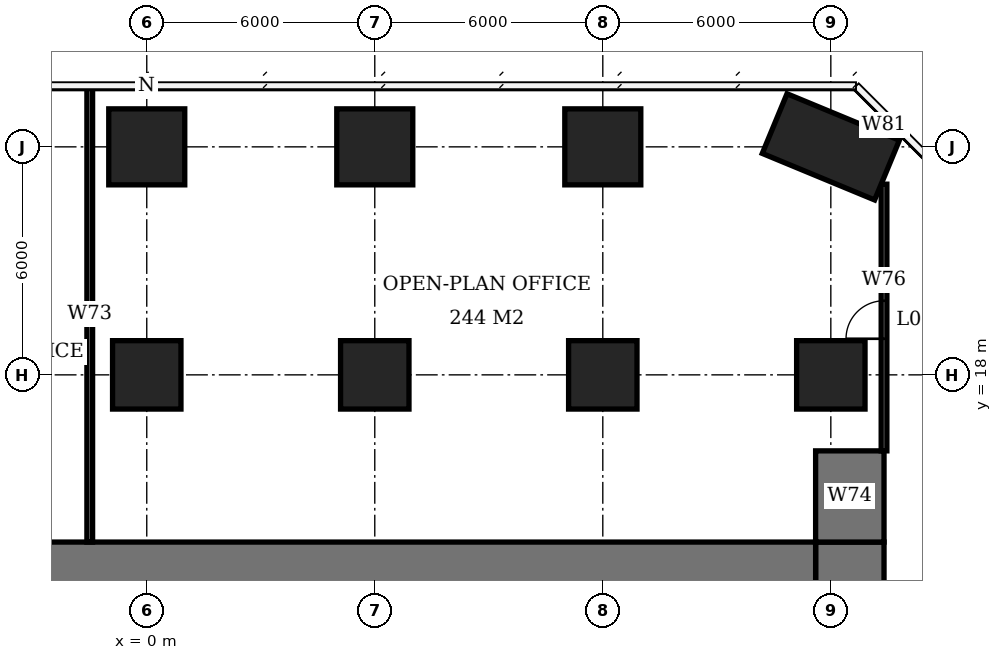
"""IFC4 building model, lengths in metres.
Left out: names, types, materials, properties, quantities, classifications, styles, units other than length and angle.
Written with IfcOpenShell. Run it as: python <this file> out.ifc"""

import sys

from ifc_helpers import new_model, si_unit, direction, frame, frame_2d, origin, origin_2d, place, context, subcontext, project, spatial, rectangle, extrude, element, fill, save


model = new_model("IFC4")
c1 = context("Model", 3, precision=1e-05, world=origin(), true_north=direction((0.0, 1.0)))
c2 = subcontext(c1, "Body", "Model", "MODEL_VIEW")
j1 = project(units=[si_unit("LENGTHUNIT", "METRE"), si_unit("PLANEANGLEUNIT", "RADIAN")], contexts=[c1])
p1 = place(None, origin())
s1 = spatial("IfcSite", under=j1, at=p1, CompositionType="ELEMENT")
p2 = place(p1, origin())
s2 = spatial("IfcBuilding", under=s1, at=p2, CompositionType="ELEMENT")
p3 = place(p2, frame((0.0, 0.0, 18.2)))
s3 = spatial("IfcBuildingStorey", under=s2, at=p3, CompositionType="ELEMENT", Elevation=18.2)
p4 = place(p3, frame((0.0, 18.0, 0.0), z_axis=(0.0, 0.0, 1.0), x_axis=(1.0, 0.0, 0.0)))
e1 = element("IfcColumn", 1, at=p4, inside=s3, PredefinedType="COLUMN", context=c2, shape_type="SweptSolid", body=[
    extrude(rectangle(XDim=1.8, YDim=1.8, at=origin_2d()), origin(), (0.0, 0.0, 1.0), 3.9),
])
p5 = place(p3, frame((0.0, 24.0, 0.0), z_axis=(0.0, 0.0, 1.0), x_axis=(1.0, 0.0, 0.0)))
e2 = element("IfcColumn", 2, at=p5, inside=s3, PredefinedType="COLUMN", context=c2, shape_type="SweptSolid", body=[
    extrude(rectangle(XDim=2.0, YDim=2.0, at=origin_2d()), origin(), (0.0, 0.0, 1.0), 3.9),
])
p6 = place(p3, frame((6.0, 18.0, 0.0), z_axis=(0.0, 0.0, 1.0), x_axis=(1.0, 0.0, 0.0)))
e3 = element("IfcColumn", 3, at=p6, inside=s3, PredefinedType="COLUMN", context=c2, shape_type="SweptSolid", body=[
    extrude(rectangle(XDim=1.8, YDim=1.8, at=origin_2d()), origin(), (0.0, 0.0, 1.0), 3.9),
])
p7 = place(p3, frame((6.0, 24.0, 0.0), z_axis=(0.0, 0.0, 1.0), x_axis=(1.0, 0.0, 0.0)))
e4 = element("IfcColumn", 4, at=p7, inside=s3, PredefinedType="COLUMN", context=c2, shape_type="SweptSolid", body=[
    extrude(rectangle(XDim=2.0, YDim=2.0, at=origin_2d()), origin(), (0.0, 0.0, 1.0), 3.9),
])
p8 = place(p3, frame((12.0, 18.0, 0.0), z_axis=(0.0, 0.0, 1.0), x_axis=(1.0, 0.0, 0.0)))
e5 = element("IfcColumn", 5, at=p8, inside=s3, PredefinedType="COLUMN", context=c2, shape_type="SweptSolid", body=[
    extrude(rectangle(XDim=1.8, YDim=1.8, at=origin_2d()), origin(), (0.0, 0.0, 1.0), 3.9),
])
p9 = place(p3, frame((12.0, 24.0, 0.0), z_axis=(0.0, 0.0, 1.0), x_axis=(1.0, 0.0, 0.0)))
e6 = element("IfcColumn", 6, at=p9, inside=s3, PredefinedType="COLUMN", context=c2, shape_type="SweptSolid", body=[
    extrude(rectangle(XDim=2.0, YDim=2.0, at=origin_2d()), origin(), (0.0, 0.0, 1.0), 3.9),
])
p10 = place(p3, frame((18.0, 18.0, 0.0), z_axis=(0.0, 0.0, 1.0), x_axis=(1.0, 0.0, 0.0)))
e7 = element("IfcColumn", 7, at=p10, inside=s3, PredefinedType="COLUMN", context=c2, shape_type="SweptSolid", body=[
    extrude(rectangle(XDim=1.8, YDim=1.8, at=origin_2d()), origin(), (0.0, 0.0, 1.0), 3.9),
])
p11 = place(p3, frame((18.0, 24.0, 0.0), z_axis=(0.0, 0.0, 1.0), x_axis=(0.923879532511, -0.382683432365, 0.0)))
e8 = element("IfcColumn", 8, at=p11, inside=s3, PredefinedType="COLUMN", context=c2, shape_type="SweptSolid", body=[
    extrude(rectangle(XDim=3.2, YDim=1.7, at=origin_2d()), origin(), (0.0, 0.0, 1.0), 3.9),
])
p12 = place(p3, frame((-5.6, 12.6, 0.0), z_axis=(0.0, 0.0, 1.0), x_axis=(1.0, 0.0, 0.0)))
e9 = element("IfcWall", 9, at=p12, inside=s3, PredefinedType="SHEAR", context=c2, shape_type="SweptSolid", body=[
    extrude(rectangle(XDim=23.2, YDim=2.0, at=frame_2d((11.6, 0.0))), origin(), (0.0, 0.0, 1.0), 3.9),
])
p13 = place(p3, frame((18.5, -7.6, 0.0), z_axis=(0.0, 0.0, 1.0), x_axis=(0.0, 1.0, 0.0)))
e10 = element("IfcWall", 10, at=p13, inside=s3, PredefinedType="SHEAR", context=c2, shape_type="SweptSolid", body=[
    extrude(rectangle(XDim=21.2, YDim=1.8, at=frame_2d((10.6, 0.0))), origin(), (0.0, 0.0, 1.0), 3.9),
])
p14 = place(p13, frame((9.2, 0.0, 0.0)))
e11 = element("IfcOpeningElement", 11, at=p14, cuts=e10, PredefinedType="OPENING", context=c2, shape_type="SweptSolid", body=[
    extrude(rectangle(XDim=1.8, YDim=2.4, at=frame_2d((0.9, 1.2))), frame((0.0, 0.91, 0.0), z_axis=(0.0, -1.0, 0.0), x_axis=(1.0, 0.0, 0.0)), (0.0, 0.0, 1.0), 1.82),
])
p15 = place(p3, frame((18.5, 13.6, 0.0), z_axis=(0.0, 0.0, 1.0), x_axis=(0.0, 1.0, 0.0)))
e12 = element("IfcWall", 12, at=p15, inside=s3, PredefinedType="SHEAR", context=c2, shape_type="SweptSolid", body=[
    extrude(rectangle(XDim=2.4, YDim=1.8, at=frame_2d((1.2, 0.0))), origin(), (0.0, 0.0, 1.0), 3.9),
])
p16 = place(p3, frame((-1.5, 13.6, 0.0), z_axis=(0.0, 0.0, 1.0), x_axis=(0.0, 1.0, 0.0)))
e13 = element("IfcWall", 13, at=p16, inside=s3, PredefinedType="PARTITIONING", context=c2, shape_type="SweptSolid", body=[
    extrude(rectangle(XDim=12.0, YDim=0.15, at=frame_2d((6.0, 0.0))), origin(), (0.0, 0.0, 1.0), 3.65),
])
p17 = place(p3, frame((19.4, 16.0, 0.0), z_axis=(0.0, 0.0, 1.0), x_axis=(0.0, 1.0, 0.0)))
e14 = element("IfcWall", 14, at=p17, inside=s3, PredefinedType="PARTITIONING", context=c2, shape_type="SweptSolid", body=[
    extrude(rectangle(XDim=7.018, YDim=0.15, at=frame_2d((3.509, 0.0))), origin(), (0.0, 0.0, 1.0), 3.65),
])
p18 = place(p17, frame((2.95, 0.0, 0.0)))
e15 = element("IfcOpeningElement", 15, at=p18, cuts=e14, PredefinedType="OPENING", context=c2, shape_type="SweptSolid", body=[
    extrude(rectangle(XDim=1.0, YDim=2.1, at=frame_2d((0.5, 1.05))), frame((0.0, 0.085, 0.0), z_axis=(0.0, -1.0, 0.0), x_axis=(1.0, 0.0, 0.0)), (0.0, 0.0, 1.0), 0.17),
])
p19 = place(p3, frame((19.4, 24.371, 0.0), z_axis=(0.0, 0.0, 1.0), x_axis=(0.0, 1.0, 0.0)))
e16 = element("IfcWall", 16, at=p19, inside=s3, PredefinedType="PARTITIONING", context=c2, shape_type="SweptSolid", body=[
    extrude(rectangle(XDim=0.4, YDim=0.15, at=frame_2d((0.2, 0.0))), origin(), (0.0, 0.0, 1.0), 3.65),
])
p20 = place(p18, origin())
e17 = element("IfcDoor", 17, at=p20, inside=s3, OperationType="SINGLE_SWING_LEFT", PredefinedType="DOOR", context=c2, shape_type="SweptSolid", body=[
    extrude(rectangle(XDim=1.0, YDim=2.1, at=frame_2d((0.5, 1.05))), frame((0.0, 0.025, 0.0), z_axis=(0.0, -1.0, 0.0), x_axis=(1.0, 0.0, 0.0)), (0.0, 0.0, 1.0), 0.05),
])
fill(e15, e17)
save(model, sys.argv[1])
